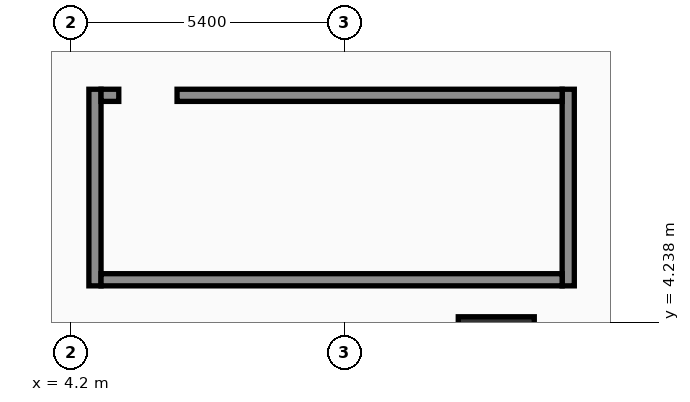
"""IFC4 building model, lengths in metres.
Left out: names, types, materials, properties, quantities, classifications, styles, units other than length and angle.
Written with IfcOpenShell. Run it as: python <this file> out.ifc"""

import sys

from ifc_helpers import new_model, si_unit, direction, frame, frame_2d, origin, origin_2d, place, context, subcontext, project, spatial, rectangle, extrude, element, fill, save


model = new_model("IFC4")
c1 = context("Model", 3, precision=1e-05, world=origin(), true_north=direction((0.0, 1.0)))
c2 = subcontext(c1, "Body", "Model", "MODEL_VIEW")
j1 = project(units=[si_unit("LENGTHUNIT", "METRE"), si_unit("PLANEANGLEUNIT", "RADIAN")], contexts=[c1])
p1 = place(None, origin())
s1 = spatial("IfcSite", under=j1, at=p1, CompositionType="ELEMENT")
p2 = place(p1, origin())
s2 = spatial("IfcBuilding", under=s1, at=p2, CompositionType="ELEMENT")
p3 = place(p2, frame((0.0, 0.0, 22.0)))
s3 = spatial("IfcBuildingStorey", under=s2, at=p3, CompositionType="ELEMENT", Elevation=22.0)
for number, where, z_axis, x_axis in (
    (1, (4.68, 4.96, 0.0), (0.0, 0.0, 1.0), (0.0, 1.0, 0.0)),
    (2, (14.02, 4.96, 0.0), (0.0, 0.0, 1.0), (0.0, 1.0, 0.0)),
):
    element("IfcWall", number, at=place(p3, frame(where, z_axis=z_axis, x_axis=x_axis)), inside=s3, PredefinedType="SOLIDWALL", context=c2, shape_type="SweptSolid", body=[
        extrude(rectangle(XDim=3.88, YDim=0.24, at=frame_2d((1.94, 0.0))), origin(), (0.0, 0.0, 1.0), 4.76),
    ])
p4 = place(p3, frame((4.8, 5.08, 0.0), z_axis=(0.0, 0.0, 1.0), x_axis=(1.0, 0.0, 0.0)))
e3 = element("IfcWall", 3, at=p4, inside=s3, PredefinedType="SOLIDWALL", context=c2, shape_type="SweptSolid", body=[
    extrude(rectangle(XDim=9.1, YDim=0.24, at=frame_2d((4.55, 0.0))), origin(), (0.0, 0.0, 1.0), 4.76),
])
p5 = place(p3, frame((4.8, 8.72, 0.0), z_axis=(0.0, 0.0, 1.0), x_axis=(1.0, 0.0, 0.0)))
e4 = element("IfcWall", 4, at=p5, inside=s3, PredefinedType="SOLIDWALL", context=c2, shape_type="SweptSolid", body=[
    extrude(rectangle(XDim=9.1, YDim=0.24, at=frame_2d((4.55, 0.0))), origin(), (0.0, 0.0, 1.0), 4.76),
])
p6 = place(p5, frame((0.35, 0.0, 0.0)))
e5 = element("IfcOpeningElement", 5, at=p6, cuts=e4, PredefinedType="OPENING", context=c2, shape_type="SweptSolid", body=[
    extrude(rectangle(XDim=1.15, YDim=2.2, at=frame_2d((0.575, 1.1))), frame((0.0, 0.13, 0.0), z_axis=(0.0, -1.0, 0.0), x_axis=(1.0, 0.0, 0.0)), (0.0, 0.0, 1.0), 0.26),
])
p7 = place(p3, frame((12.6, 3.6, 0.0), z_axis=(0.0, 0.0, 1.0), x_axis=(1.0, 0.0, 0.0)))
e6 = element("IfcColumn", 6, at=p7, inside=s3, PredefinedType="COLUMN", context=c2, shape_type="SweptSolid", body=[
    extrude(rectangle(XDim=1.5, YDim=1.5, at=origin_2d()), origin(), (0.0, 0.0, 1.0), 4.76),
])
p8 = place(p6, origin())
e7 = element("IfcDoor", 7, at=p8, inside=s3, OperationType="SINGLE_SWING_RIGHT", PredefinedType="DOOR", context=c2, shape_type="SweptSolid", body=[
    extrude(rectangle(XDim=1.15, YDim=2.2, at=frame_2d((0.575, 1.1))), frame((0.0, 0.025, 0.0), z_axis=(0.0, -1.0, 0.0), x_axis=(1.0, 0.0, 0.0)), (0.0, 0.0, 1.0), 0.05),
])
fill(e5, e7)
save(model, sys.argv[1])
